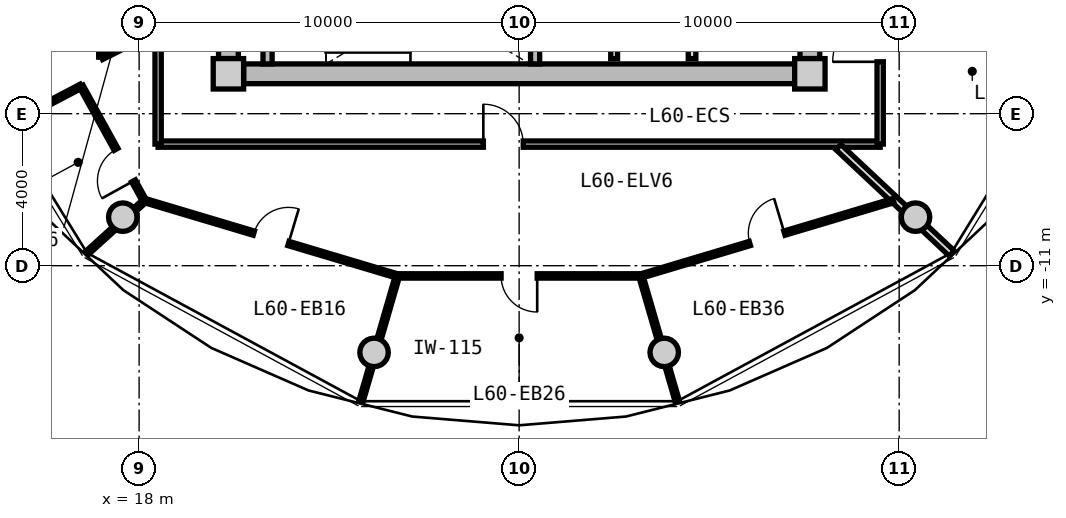
"""IFC4 building model, lengths in metres.
Left out: names, types, materials, properties, quantities, classifications, styles, units other than length and angle.
Written with IfcOpenShell. Run it as: python <this file> out.ifc"""

import sys

from ifc_helpers import new_model, si_unit, direction, frame, frame_2d, origin, origin_2d, place, context, subcontext, project, spatial, rectangle, circle, extrude, source, transform, mapped, element, fill, save


model = new_model("IFC4")
c1 = context("Model", 3, precision=1e-05, world=origin(), true_north=direction((0.0, 1.0)))
c2 = subcontext(c1, "Body", "Model", "MODEL_VIEW")
j1 = project(units=[si_unit("LENGTHUNIT", "METRE"), si_unit("PLANEANGLEUNIT", "RADIAN")], contexts=[c1])
p1 = place(None, origin())
s1 = spatial("IfcSite", under=j1, at=p1, CompositionType="ELEMENT")
p2 = place(p1, origin())
s2 = spatial("IfcBuilding", under=s1, at=p2, CompositionType="ELEMENT")
p3 = place(p2, frame((0.0, 0.0, 193.7)))
s3 = spatial("IfcBuildingStorey", under=s2, at=p3, CompositionType="ELEMENT", Elevation=193.7)
m1 = source(origin(), c2, "Body", "SweptSolid", [
    extrude(rectangle(XDim=0.8, YDim=0.8, at=origin_2d()), origin(), (0.0, 0.0, 1.0), 3.05),
])
for number, where, z_axis, x_axis in (
    (1, (20.35, -5.95, 0.0), (0.0, 0.0, 1.0), (1.0, 0.0, 0.0)),
    (2, (35.65, -5.95, 0.0), (0.0, 0.0, 1.0), (1.0, 0.0, 0.0)),
):
    element("IfcColumn", number, at=place(p3, frame(where, z_axis=z_axis, x_axis=x_axis)), inside=s3, PredefinedType="COLUMN", context=c2, shape_type="MappedRepresentation", body=[
        mapped(m1, transform((0.0, 0.0, 0.0), x_axis=(1.0, 0.0, 0.0), y_axis=(0.0, 1.0, 0.0), z_axis=(0.0, 0.0, 1.0), scale=1.0)),
    ])
m2 = source(origin(), c2, "Body", "SweptSolid", [
    extrude(rectangle(XDim=14.5, YDim=0.52, at=frame_2d((7.25, 0.0))), origin(), (0.0, 0.0, 1.0), 2.81),
])
p4 = place(p3, frame((35.25, -5.95, 0.0), z_axis=(0.0, 0.0, 1.0), x_axis=(-1.0, 0.0, 0.0)))
e3 = element("IfcWall", 3, at=p4, inside=s3, PredefinedType="SHEAR", context=c2, shape_type="MappedRepresentation", body=[
    mapped(m2, transform((0.0, 0.0, 0.0), x_axis=(1.0, 0.0, 0.0), y_axis=(0.0, 1.0, 0.0), z_axis=(0.0, 0.0, 1.0), scale=1.0)),
])
m3 = source(origin(), c2, "Body", "SweptSolid", [
    extrude(rectangle(XDim=11.1, YDim=0.52, at=frame_2d((5.55, 0.0))), origin(), (0.0, 0.0, 1.0), 2.81),
])
p5 = place(p3, frame((20.35, -5.55, 0.0), z_axis=(0.0, 0.0, 1.0), x_axis=(0.0, 1.0, 0.0)))
e4 = element("IfcWall", 4, at=p5, inside=s3, PredefinedType="SHEAR", context=c2, shape_type="MappedRepresentation", body=[
    mapped(m3, transform((0.0, 0.0, 0.0), x_axis=(1.0, 0.0, 0.0), y_axis=(0.0, 1.0, 0.0), z_axis=(0.0, 0.0, 1.0), scale=1.0)),
])
p6 = place(p5, frame((3.8, 0.0, 0.0)))
e5 = element("IfcOpeningElement", 5, at=p6, cuts=e4, PredefinedType="OPENING", context=c2, shape_type="SweptSolid", body=[
    extrude(rectangle(XDim=1.2, YDim=2.15, at=frame_2d((0.6, 1.075))), frame((0.0, 0.27, 0.0), z_axis=(0.0, -1.0, 0.0), x_axis=(1.0, 0.0, 0.0)), (0.0, 0.0, 1.0), 0.54),
])
p7 = place(p3, frame((35.65, 5.55, 0.0), z_axis=(0.0, 0.0, 1.0), x_axis=(0.0, -1.0, 0.0)))
e6 = element("IfcWall", 6, at=p7, inside=s3, PredefinedType="SHEAR", context=c2, shape_type="MappedRepresentation", body=[
    mapped(m3, transform((0.0, 0.0, 0.0), x_axis=(1.0, 0.0, 0.0), y_axis=(0.0, 1.0, 0.0), z_axis=(0.0, 0.0, 1.0), scale=1.0)),
])
p8 = place(p7, frame((5.65, 0.0, 0.0)))
e7 = element("IfcOpeningElement", 7, at=p8, cuts=e6, PredefinedType="OPENING", context=c2, shape_type="SweptSolid", body=[
    extrude(rectangle(XDim=1.2, YDim=2.15, at=frame_2d((0.6, 1.075))), frame((0.0, 0.27, 0.0), z_axis=(0.0, -1.0, 0.0), x_axis=(1.0, 0.0, 0.0)), (0.0, 0.0, 1.0), 0.54),
])
m4 = source(origin(), c2, "Body", "SweptSolid", [
    extrude(circle(Radius=0.375, at=origin_2d()), origin(), (0.0, 0.0, 1.0), 3.05),
])
for number, where, z_axis, x_axis in (
    (8, (17.57, -9.723, 0.0), (0.0, 0.0, 1.0), (1.0, 0.0, 0.0)),
    (9, (24.182, -13.281, 0.0), (0.0, 0.0, 1.0), (1.0, 0.0, 0.0)),
    (10, (31.818, -13.281, 0.0), (0.0, 0.0, 1.0), (1.0, 0.0, 0.0)),
    (11, (38.43, -9.723, 0.0), (0.0, 0.0, 1.0), (1.0, 0.0, 0.0)),
):
    element("IfcColumn", number, at=place(p3, frame(where, z_axis=z_axis, x_axis=x_axis)), inside=s3, PredefinedType="COLUMN", context=c2, shape_type="MappedRepresentation", body=[
        mapped(m4, transform((0.0, 0.0, 0.0), x_axis=(1.0, 0.0, 0.0), y_axis=(0.0, 1.0, 0.0), z_axis=(0.0, 0.0, 1.0), scale=1.0)),
    ])
m5 = source(origin(), c2, "Body", "SweptSolid", [
    extrude(rectangle(XDim=3.24, YDim=0.24, at=frame_2d((1.62, 0.0))), origin(), (0.0, 0.0, 1.0), 2.81),
])
for number, where, z_axis, x_axis in (
    (12, (21.38, -5.69, 0.0), (0.0, 0.0, 1.0), (0.0, 1.0, 0.0)),
    (13, (28.42, -5.69, 0.0), (0.0, 0.0, 1.0), (0.0, 1.0, 0.0)),
):
    element("IfcWall", number, at=place(p3, frame(where, z_axis=z_axis, x_axis=x_axis)), inside=s3, PredefinedType="PARTITIONING", context=c2, shape_type="MappedRepresentation", body=[
        mapped(m5, transform((0.0, 0.0, 0.0), x_axis=(1.0, 0.0, 0.0), y_axis=(0.0, 1.0, 0.0), z_axis=(0.0, 0.0, 1.0), scale=1.0)),
    ])
m6 = source(origin(), c2, "Body", "SweptSolid", [
    extrude(rectangle(XDim=3.8, YDim=0.2, at=frame_2d((1.9, 0.0))), origin(), (0.0, 0.0, 1.0), 2.795),
])
p9 = place(p3, frame((32.55, -5.55, 0.0), z_axis=(0.0, 0.0, 1.0), x_axis=(0.0, 1.0, 0.0)))
e14 = element("IfcWall", 14, at=p9, inside=s3, PredefinedType="PARTITIONING", context=c2, shape_type="MappedRepresentation", body=[
    mapped(m6, transform((0.0, 0.0, 0.0), x_axis=(1.0, 0.0, 0.0), y_axis=(0.0, 1.0, 0.0), z_axis=(0.0, 0.0, 1.0), scale=1.0)),
])
m7 = source(origin(), c2, "Body", "SweptSolid", [
    extrude(rectangle(XDim=4.2, YDim=0.18, at=frame_2d((2.1, 0.0))), origin(), (0.0, 0.0, 1.0), 2.795),
])
p10 = place(p3, frame((30.5, -5.55, 0.0), z_axis=(0.0, 0.0, 1.0), x_axis=(0.0, 1.0, 0.0)))
e15 = element("IfcWall", 15, at=p10, inside=s3, PredefinedType="PARTITIONING", context=c2, shape_type="MappedRepresentation", body=[
    mapped(m7, transform((0.0, 0.0, 0.0), x_axis=(1.0, 0.0, 0.0), y_axis=(0.0, 1.0, 0.0), z_axis=(0.0, 0.0, 1.0), scale=1.0)),
])
m8 = source(origin(), c2, "Body", "SweptSolid", [
    extrude(rectangle(XDim=19.0, YDim=0.165, at=frame_2d((9.5, 0.0))), origin(), (0.0, 0.0, 1.0), 2.795),
])
p11 = place(p3, frame((37.5, -7.8, 0.0), z_axis=(0.0, 0.0, 1.0), x_axis=(-1.0, 0.0, 0.0)))
e16 = element("IfcWall", 16, at=p11, inside=s3, PredefinedType="PARTITIONING", context=c2, shape_type="MappedRepresentation", body=[
    mapped(m8, transform((0.0, 0.0, 0.0), x_axis=(1.0, 0.0, 0.0), y_axis=(0.0, 1.0, 0.0), z_axis=(0.0, 0.0, 1.0), scale=1.0)),
])
p12 = place(p11, frame((9.392, 0.0, 0.0)))
e17 = element("IfcOpeningElement", 17, at=p12, cuts=e16, PredefinedType="OPENING", context=c2, shape_type="SweptSolid", body=[
    extrude(rectangle(XDim=1.05, YDim=2.15, at=frame_2d((0.525, 1.075))), frame((0.0, 0.093, 0.0), z_axis=(0.0, -1.0, 0.0), x_axis=(1.0, 0.0, 0.0)), (0.0, 0.0, 1.0), 0.185),
])
m9 = source(origin(), c2, "Body", "SweptSolid", [
    extrude(rectangle(XDim=6.88, YDim=0.165, at=frame_2d((3.44, 0.0))), origin(), (0.0, 0.0, 1.0), 2.795),
])
p13 = place(p3, frame((18.5, -7.8, 0.0), z_axis=(0.0, 0.0, 1.0), x_axis=(0.0, 1.0, 0.0)))
e18 = element("IfcWall", 18, at=p13, inside=s3, PredefinedType="PARTITIONING", context=c2, shape_type="MappedRepresentation", body=[
    mapped(m9, transform((0.0, 0.0, 0.0), x_axis=(1.0, 0.0, 0.0), y_axis=(0.0, 1.0, 0.0), z_axis=(0.0, 0.0, 1.0), scale=1.0)),
])
p14 = place(p3, frame((37.5, -0.92, 0.0), z_axis=(0.0, 0.0, 1.0), x_axis=(0.0, -1.0, 0.0)))
e19 = element("IfcWall", 19, at=p14, inside=s3, PredefinedType="PARTITIONING", context=c2, shape_type="MappedRepresentation", body=[
    mapped(m9, transform((0.0, 0.0, 0.0), x_axis=(1.0, 0.0, 0.0), y_axis=(0.0, 1.0, 0.0), z_axis=(0.0, 0.0, 1.0), scale=1.0)),
])
p15 = place(p14, frame((3.464, 0.0, 0.0)))
e20 = element("IfcOpeningElement", 20, at=p15, cuts=e19, PredefinedType="OPENING", context=c2, shape_type="SweptSolid", body=[
    extrude(rectangle(XDim=1.25, YDim=2.2, at=frame_2d((0.625, 1.1))), frame((0.0, 0.093, 0.0), z_axis=(0.0, -1.0, 0.0), x_axis=(1.0, 0.0, 0.0)), (0.0, 0.0, 1.0), 0.185),
])
m10 = source(origin(), c2, "Body", "SweptSolid", [
    extrude(rectangle(XDim=4.089, YDim=0.19, at=frame_2d((2.044, 0.0))), origin(), (0.0, 0.0, 1.0), 2.395),
])
p16 = place(p3, frame((36.402, -7.88, 0.0), z_axis=(0.0, 0.0, 1.0), x_axis=(0.729401273609, -0.684086092577, 0.0)))
e21 = element("IfcWall", 21, at=p16, inside=s3, PredefinedType="PARTITIONING", context=c2, shape_type="MappedRepresentation", body=[
    mapped(m10, transform((0.0, 0.0, 0.0), x_axis=(1.0, 0.0, 0.0), y_axis=(0.0, 1.0, 0.0), z_axis=(0.0, 0.0, 1.0), scale=1.0)),
])
m11 = source(origin(), c2, "Body", "SweptSolid", [
    extrude(rectangle(XDim=6.936, YDim=0.115, at=frame_2d((3.468, 0.0))), origin(), (0.0, 0.0, 1.0), 2.795),
])
p17 = place(p3, frame((18.151, -9.287, 0.0), z_axis=(0.0, 0.0, 1.0), x_axis=(0.958186895835, -0.286143098205, 0.0)))
e22 = element("IfcWall", 22, at=p17, inside=s3, PredefinedType="PARTITIONING", context=c2, shape_type="MappedRepresentation", body=[
    mapped(m11, transform((0.0, 0.0, 0.0), x_axis=(1.0, 0.0, 0.0), y_axis=(0.0, 1.0, 0.0), z_axis=(0.0, 0.0, 1.0), scale=1.0)),
])
p18 = place(p17, frame((2.993, 0.0, 0.0)))
e23 = element("IfcOpeningElement", 23, at=p18, cuts=e22, PredefinedType="OPENING", context=c2, shape_type="SweptSolid", body=[
    extrude(rectangle(XDim=0.95, YDim=2.1, at=frame_2d((0.475, 1.05))), frame((0.0, 0.067, 0.0), z_axis=(0.0, -1.0, 0.0), x_axis=(1.0, 0.0, 0.0)), (0.0, 0.0, 1.0), 0.135),
])
m12 = source(origin(), c2, "Body", "SweptSolid", [
    extrude(rectangle(XDim=2.072, YDim=0.115, at=frame_2d((1.036, 0.0))), origin(), (0.0, 0.0, 1.0), 2.395),
])
p19 = place(p3, frame((18.151, -9.287, 0.0), z_axis=(0.0, 0.0, 1.0), x_axis=(-0.741410125356, -0.671052178314, 0.0)))
e24 = element("IfcWall", 24, at=p19, inside=s3, PredefinedType="PARTITIONING", context=c2, shape_type="MappedRepresentation", body=[
    mapped(m12, transform((0.0, 0.0, 0.0), x_axis=(1.0, 0.0, 0.0), y_axis=(0.0, 1.0, 0.0), z_axis=(0.0, 0.0, 1.0), scale=1.0)),
])
m13 = source(origin(), c2, "Body", "SweptSolid", [
    extrude(rectangle(XDim=6.404, YDim=0.115, at=frame_2d((3.202, 0.0))), origin(), (0.0, 0.0, 1.0), 2.795),
])
p20 = place(p3, frame((24.798, -11.269, 0.0), z_axis=(0.0, 0.0, 1.0), x_axis=(1.0, 0.0, 0.0)))
e25 = element("IfcWall", 25, at=p20, inside=s3, PredefinedType="PARTITIONING", context=c2, shape_type="MappedRepresentation", body=[
    mapped(m13, transform((0.0, 0.0, 0.0), x_axis=(1.0, 0.0, 0.0), y_axis=(0.0, 1.0, 0.0), z_axis=(0.0, 0.0, 1.0), scale=1.0)),
])
p21 = place(p20, frame((2.727, 0.0, 0.0)))
e26 = element("IfcOpeningElement", 26, at=p21, cuts=e25, PredefinedType="OPENING", context=c2, shape_type="SweptSolid", body=[
    extrude(rectangle(XDim=0.95, YDim=2.1, at=frame_2d((0.475, 1.05))), frame((0.0, 0.067, 0.0), z_axis=(0.0, -1.0, 0.0), x_axis=(1.0, 0.0, 0.0)), (0.0, 0.0, 1.0), 0.135),
])
m14 = source(origin(), c2, "Body", "SweptSolid", [
    extrude(rectangle(XDim=3.454, YDim=0.115, at=frame_2d((1.727, 0.0))), origin(), (0.0, 0.0, 1.0), 2.395),
])
p22 = place(p3, frame((24.798, -11.269, 0.0), z_axis=(0.0, 0.0, 1.0), x_axis=(-0.279348499358, -0.960189781193, 0.0)))
e27 = element("IfcWall", 27, at=p22, inside=s3, PredefinedType="PARTITIONING", context=c2, shape_type="MappedRepresentation", body=[
    mapped(m14, transform((0.0, 0.0, 0.0), x_axis=(1.0, 0.0, 0.0), y_axis=(0.0, 1.0, 0.0), z_axis=(0.0, 0.0, 1.0), scale=1.0)),
])
p23 = place(p3, frame((31.203, -11.272, 0.0), z_axis=(0.0, 0.0, 1.0), x_axis=(0.958186895835, 0.286143098205, 0.0)))
e28 = element("IfcWall", 28, at=p23, inside=s3, PredefinedType="PARTITIONING", context=c2, shape_type="MappedRepresentation", body=[
    mapped(m11, transform((0.0, 0.0, 0.0), x_axis=(1.0, 0.0, 0.0), y_axis=(0.0, 1.0, 0.0), z_axis=(0.0, 0.0, 1.0), scale=1.0)),
])
p24 = place(p23, frame((2.993, 0.0, 0.0)))
e29 = element("IfcOpeningElement", 29, at=p24, cuts=e28, PredefinedType="OPENING", context=c2, shape_type="SweptSolid", body=[
    extrude(rectangle(XDim=0.95, YDim=2.1, at=frame_2d((0.475, 1.05))), frame((0.0, 0.067, 0.0), z_axis=(0.0, -1.0, 0.0), x_axis=(1.0, 0.0, 0.0)), (0.0, 0.0, 1.0), 0.135),
])
m15 = source(origin(), c2, "Body", "SweptSolid", [
    extrude(rectangle(XDim=3.451, YDim=0.115, at=frame_2d((1.726, 0.0))), origin(), (0.0, 0.0, 1.0), 2.395),
])
p25 = place(p3, frame((31.203, -11.272, 0.0), z_axis=(0.0, 0.0, 1.0), x_axis=(0.279361559083, -0.960185981624, 0.0)))
e30 = element("IfcWall", 30, at=p25, inside=s3, PredefinedType="PARTITIONING", context=c2, shape_type="MappedRepresentation", body=[
    mapped(m15, transform((0.0, 0.0, 0.0), x_axis=(1.0, 0.0, 0.0), y_axis=(0.0, 1.0, 0.0), z_axis=(0.0, 0.0, 1.0), scale=1.0)),
])
m16 = source(origin(), c2, "Body", "SweptSolid", [
    extrude(rectangle(XDim=1.638, YDim=0.14, at=frame_2d((0.819, 0.0))), origin(), (0.0, 0.0, 1.0), 2.795),
])
p26 = place(p3, frame((18.47, -4.778, 0.0), z_axis=(0.0, 0.0, 1.0), x_axis=(-0.893919977945, -0.448226586707, 0.0)))
e31 = element("IfcWall", 31, at=p26, inside=s3, PredefinedType="PARTITIONING", context=c2, shape_type="MappedRepresentation", body=[
    mapped(m16, transform((0.0, 0.0, 0.0), x_axis=(1.0, 0.0, 0.0), y_axis=(0.0, 1.0, 0.0), z_axis=(0.0, 0.0, 1.0), scale=1.0)),
])
m17 = source(origin(), c2, "Body", "SweptSolid", [
    extrude(rectangle(XDim=2.759, YDim=0.14, at=frame_2d((1.379, 0.0))), origin(), (0.0, 0.0, 1.0), 2.795),
])
p27 = place(p3, frame((17.005, -5.513, 0.0), z_axis=(0.0, 0.0, 1.0), x_axis=(0.01194710728, 0.999928630767, 0.0)))
e32 = element("IfcWall", 32, at=p27, inside=s3, PredefinedType="PARTITIONING", context=c2, shape_type="MappedRepresentation", body=[
    mapped(m17, transform((0.0, 0.0, 0.0), x_axis=(1.0, 0.0, 0.0), y_axis=(0.0, 1.0, 0.0), z_axis=(0.0, 0.0, 1.0), scale=1.0)),
])
p28 = place(p27, frame((0.919, 0.0, 0.0)))
e33 = element("IfcOpeningElement", 33, at=p28, cuts=e32, PredefinedType="OPENING", context=c2, shape_type="SweptSolid", body=[
    extrude(rectangle(XDim=0.92, YDim=2.1, at=frame_2d((0.46, 1.05))), frame((0.0, 0.08, 0.0), z_axis=(0.0, -1.0, 0.0), x_axis=(1.0, 0.0, 0.0)), (0.0, 0.0, 1.0), 0.16),
])
m18 = source(origin(), c2, "Body", "SweptSolid", [
    extrude(rectangle(XDim=2.193, YDim=0.115, at=frame_2d((1.097, 0.0))), origin(), (0.0, 0.0, 1.0), 2.795),
])
p29 = place(p3, frame((16.475, -6.275, 0.0), z_axis=(0.0, 0.0, 1.0), x_axis=(-0.885783595046, -0.464098505435, 0.0)))
e34 = element("IfcWall", 34, at=p29, inside=s3, PredefinedType="PARTITIONING", context=c2, shape_type="MappedRepresentation", body=[
    mapped(m18, transform((0.0, 0.0, 0.0), x_axis=(1.0, 0.0, 0.0), y_axis=(0.0, 1.0, 0.0), z_axis=(0.0, 0.0, 1.0), scale=1.0)),
])
m19 = source(origin(), c2, "Body", "SweptSolid", [
    extrude(rectangle(XDim=3.45, YDim=0.115, at=frame_2d((1.725, 0.0))), origin(), (0.0, 0.0, 1.0), 2.795),
])
p30 = place(p3, frame((16.475, -6.275, 0.0), z_axis=(0.0, 0.0, 1.0), x_axis=(0.483659007882, -0.875256513312, 0.0)))
e35 = element("IfcWall", 35, at=p30, inside=s3, PredefinedType="PARTITIONING", context=c2, shape_type="MappedRepresentation", body=[
    mapped(m19, transform((0.0, 0.0, 0.0), x_axis=(1.0, 0.0, 0.0), y_axis=(0.0, 1.0, 0.0), z_axis=(0.0, 0.0, 1.0), scale=1.0)),
])
p31 = place(p30, frame((1.9, 0.0, 0.0)))
e36 = element("IfcOpeningElement", 36, at=p31, cuts=e35, PredefinedType="OPENING", context=c2, shape_type="SweptSolid", body=[
    extrude(rectangle(XDim=0.95, YDim=2.1, at=frame_2d((0.475, 1.05))), frame((0.0, 0.067, 0.0), z_axis=(0.0, -1.0, 0.0), x_axis=(1.0, 0.0, 0.0)), (0.0, 0.0, 1.0), 0.135),
])
m20 = source(origin(), c2, "Body", "SweptSolid", [
    extrude(rectangle(XDim=1.05, YDim=2.15, at=frame_2d((0.525, 1.075))), frame((0.0, 0.025, 0.0), z_axis=(0.0, -1.0, 0.0), x_axis=(1.0, 0.0, 0.0)), (0.0, 0.0, 1.0), 0.05),
])
p32 = place(p12, frame((1.05, 0.0, 0.0), z_axis=(0.0, 0.0, 1.0), x_axis=(-1.0, 0.0, 0.0)))
e37 = element("IfcDoor", 37, at=p32, inside=s3, OperationType="SINGLE_SWING_LEFT", PredefinedType="DOOR", context=c2, shape_type="MappedRepresentation", body=[
    mapped(m20, transform((0.0, 0.0, 0.0), x_axis=(1.0, 0.0, 0.0), y_axis=(0.0, 1.0, 0.0), z_axis=(0.0, 0.0, 1.0), scale=1.0)),
])
fill(e17, e37)
m21 = source(origin(), c2, "Body", "SweptSolid", [
    extrude(rectangle(XDim=0.95, YDim=2.1, at=frame_2d((0.475, 1.05))), frame((0.0, 0.025, 0.0), z_axis=(0.0, -1.0, 0.0), x_axis=(1.0, 0.0, 0.0)), (0.0, 0.0, 1.0), 0.05),
])
p33 = place(p31, frame((0.95, 0.0, 0.0), z_axis=(0.0, 0.0, 1.0), x_axis=(-1.0, 0.0, 0.0)))
e38 = element("IfcDoor", 38, at=p33, inside=s3, OperationType="SINGLE_SWING_LEFT", PredefinedType="DOOR", context=c2, shape_type="MappedRepresentation", body=[
    mapped(m21, transform((0.0, 0.0, 0.0), x_axis=(1.0, 0.0, 0.0), y_axis=(0.0, 1.0, 0.0), z_axis=(0.0, 0.0, 1.0), scale=1.0)),
])
fill(e36, e38)
p34 = place(p18, origin())
e39 = element("IfcDoor", 39, at=p34, inside=s3, OperationType="SINGLE_SWING_RIGHT", PredefinedType="DOOR", context=c2, shape_type="MappedRepresentation", body=[
    mapped(m21, transform((0.0, 0.0, 0.0), x_axis=(1.0, 0.0, 0.0), y_axis=(0.0, 1.0, 0.0), z_axis=(0.0, 0.0, 1.0), scale=1.0)),
])
fill(e23, e39)
p35 = place(p21, frame((0.95, 0.0, 0.0), z_axis=(0.0, 0.0, 1.0), x_axis=(-1.0, 0.0, 0.0)))
e40 = element("IfcDoor", 40, at=p35, inside=s3, OperationType="SINGLE_SWING_LEFT", PredefinedType="DOOR", context=c2, shape_type="MappedRepresentation", body=[
    mapped(m21, transform((0.0, 0.0, 0.0), x_axis=(1.0, 0.0, 0.0), y_axis=(0.0, 1.0, 0.0), z_axis=(0.0, 0.0, 1.0), scale=1.0)),
])
fill(e26, e40)
p36 = place(p24, origin())
e41 = element("IfcDoor", 41, at=p36, inside=s3, OperationType="SINGLE_SWING_RIGHT", PredefinedType="DOOR", context=c2, shape_type="MappedRepresentation", body=[
    mapped(m21, transform((0.0, 0.0, 0.0), x_axis=(1.0, 0.0, 0.0), y_axis=(0.0, 1.0, 0.0), z_axis=(0.0, 0.0, 1.0), scale=1.0)),
])
fill(e29, e41)
m22 = source(origin(), c2, "Body", "SweptSolid", [
    extrude(rectangle(XDim=1.25, YDim=2.2, at=frame_2d((0.625, 1.1))), frame((0.0, 0.025, 0.0), z_axis=(0.0, -1.0, 0.0), x_axis=(1.0, 0.0, 0.0)), (0.0, 0.0, 1.0), 0.05),
])
p37 = place(p15, frame((1.25, 0.0, 0.0), z_axis=(0.0, 0.0, 1.0), x_axis=(-1.0, 0.0, 0.0)))
e42 = element("IfcDoor", 42, at=p37, inside=s3, OperationType="SINGLE_SWING_LEFT", PredefinedType="DOOR", context=c2, shape_type="MappedRepresentation", body=[
    mapped(m22, transform((0.0, 0.0, 0.0), x_axis=(1.0, 0.0, 0.0), y_axis=(0.0, 1.0, 0.0), z_axis=(0.0, 0.0, 1.0), scale=1.0)),
])
fill(e20, e42)
save(model, sys.argv[1])
